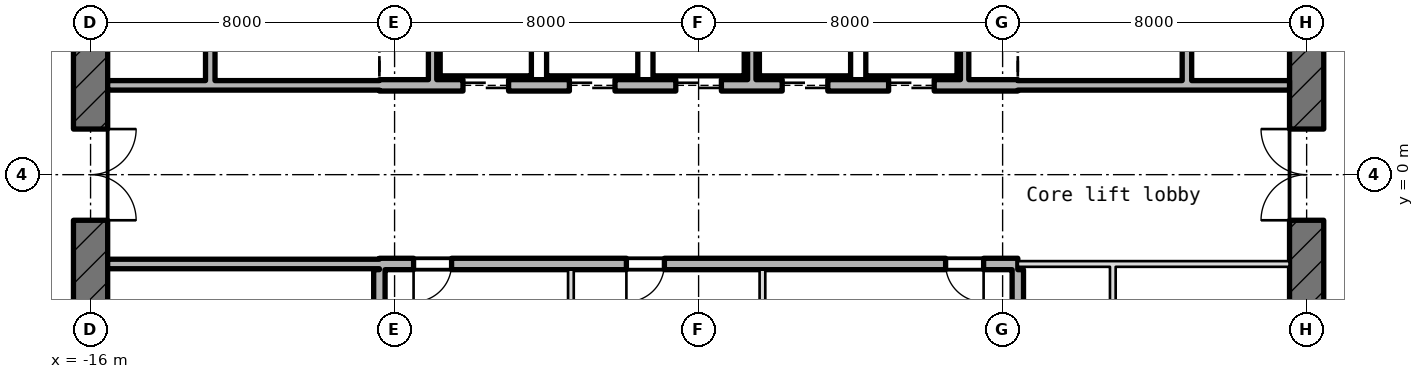
"""IFC4 building model, lengths in metres.
Left out: names, types, materials, properties, quantities, classifications, styles, units other than length and angle.
Written with IfcOpenShell. Run it as: python <this file> out.ifc"""

import sys

from ifc_helpers import new_model, si_unit, direction, frame, frame_2d, origin, place, context, subcontext, project, spatial, rectangle, extrude, element, fill, save


model = new_model("IFC4")
c1 = context("Model", 3, precision=1e-05, world=origin(), true_north=direction((0.0, 1.0)))
c2 = subcontext(c1, "Body", "Model", "MODEL_VIEW")
j1 = project(units=[si_unit("LENGTHUNIT", "METRE"), si_unit("PLANEANGLEUNIT", "RADIAN")], contexts=[c1])
p1 = place(None, origin())
s1 = spatial("IfcSite", under=j1, at=p1, CompositionType="ELEMENT")
p2 = place(p1, origin())
s2 = spatial("IfcBuilding", under=s1, at=p2, CompositionType="ELEMENT")
p3 = place(p2, frame((0.0, 0.0, 260.65)))
s3 = spatial("IfcBuildingStorey", under=s2, at=p3, CompositionType="ELEMENT", Elevation=260.65)
p4 = place(p3, frame((16.0, -10.186, -0.18), z_axis=(0.0, 0.0, 1.0), x_axis=(0.0, 1.0, 0.0)))
e1 = element("IfcWall", 1, at=p4, inside=s3, PredefinedType="SHEAR", context=c2, shape_type="SweptSolid", body=[
    extrude(rectangle(XDim=20.373, YDim=0.9, at=frame_2d((10.186, 0.0))), origin(), (0.0, 0.0, 1.0), 4.15),
])
p5 = place(p4, frame((8.986, 0.0, 0.18)))
e2 = element("IfcOpeningElement", 2, at=p5, cuts=e1, PredefinedType="OPENING", context=c2, shape_type="SweptSolid", body=[
    extrude(rectangle(XDim=2.4, YDim=2.1, at=frame_2d((1.2, 1.05))), frame((0.0, 0.46, 0.0), z_axis=(0.0, -1.0, 0.0), x_axis=(1.0, 0.0, 0.0)), (0.0, 0.0, 1.0), 0.92),
])
p6 = place(p4, frame((13.586, 0.0, 0.18)))
e3 = element("IfcOpeningElement", 3, at=p6, cuts=e1, PredefinedType="OPENING", context=c2, shape_type="SweptSolid", body=[
    extrude(rectangle(XDim=1.2, YDim=2.1, at=frame_2d((0.6, 1.05))), frame((0.0, 0.46, 0.0), z_axis=(0.0, -1.0, 0.0), x_axis=(1.0, 0.0, 0.0)), (0.0, 0.0, 1.0), 0.92),
])
p7 = place(p3, frame((-16.0, 10.186, -0.18), z_axis=(0.0, 0.0, 1.0), x_axis=(0.0, -1.0, 0.0)))
e4 = element("IfcWall", 4, at=p7, inside=s3, PredefinedType="SHEAR", context=c2, shape_type="SweptSolid", body=[
    extrude(rectangle(XDim=20.373, YDim=0.9, at=frame_2d((10.186, 0.0))), origin(), (0.0, 0.0, 1.0), 4.15),
])
p8 = place(p7, frame((8.986, 0.0, 0.18)))
e5 = element("IfcOpeningElement", 5, at=p8, cuts=e4, PredefinedType="OPENING", context=c2, shape_type="SweptSolid", body=[
    extrude(rectangle(XDim=2.4, YDim=2.1, at=frame_2d((1.2, 1.05))), frame((0.0, 0.46, 0.0), z_axis=(0.0, -1.0, 0.0), x_axis=(1.0, 0.0, 0.0)), (0.0, 0.0, 1.0), 0.92),
])
p9 = place(p7, frame((5.586, 0.0, 0.18)))
e6 = element("IfcOpeningElement", 6, at=p9, cuts=e4, PredefinedType="OPENING", context=c2, shape_type="SweptSolid", body=[
    extrude(rectangle(XDim=1.2, YDim=2.1, at=frame_2d((0.6, 1.05))), frame((0.0, 0.46, 0.0), z_axis=(0.0, -1.0, 0.0), x_axis=(1.0, 0.0, 0.0)), (0.0, 0.0, 1.0), 0.92),
])
p10 = place(p3, frame((-15.55, -2.35, 0.0), z_axis=(0.0, 0.0, 1.0), x_axis=(1.0, 0.0, 0.0)))
e7 = element("IfcWall", 7, at=p10, inside=s3, PredefinedType="STANDARD", context=c2, shape_type="SweptSolid", body=[
    extrude(rectangle(XDim=7.15, YDim=0.25, at=frame_2d((3.575, 0.0))), origin(), (0.0, 0.0, 1.0), 3.97),
])
p11 = place(p3, frame((-8.4, -2.35, -0.18), z_axis=(0.0, 0.0, 1.0), x_axis=(1.0, 0.0, 0.0)))
e8 = element("IfcWall", 8, at=p11, inside=s3, PredefinedType="SHEAR", context=c2, shape_type="SweptSolid", body=[
    extrude(rectangle(XDim=16.8, YDim=0.3, at=frame_2d((8.4, 0.0))), origin(), (0.0, 0.0, 1.0), 4.15),
])
p12 = place(p11, frame((0.9, 0.0, 0.18)))
e9 = element("IfcOpeningElement", 9, at=p12, cuts=e8, PredefinedType="OPENING", context=c2, shape_type="SweptSolid", body=[
    extrude(rectangle(XDim=1.0, YDim=2.1, at=frame_2d((0.5, 1.05))), frame((0.0, 0.16, 0.0), z_axis=(0.0, -1.0, 0.0), x_axis=(1.0, 0.0, 0.0)), (0.0, 0.0, 1.0), 0.32),
])
p13 = place(p11, frame((6.5, 0.0, 0.18)))
e10 = element("IfcOpeningElement", 10, at=p13, cuts=e8, PredefinedType="OPENING", context=c2, shape_type="SweptSolid", body=[
    extrude(rectangle(XDim=1.0, YDim=2.1, at=frame_2d((0.5, 1.05))), frame((0.0, 0.16, 0.0), z_axis=(0.0, -1.0, 0.0), x_axis=(1.0, 0.0, 0.0)), (0.0, 0.0, 1.0), 0.32),
])
p14 = place(p11, frame((14.9, 0.0, 0.18)))
e11 = element("IfcOpeningElement", 11, at=p14, cuts=e8, PredefinedType="OPENING", context=c2, shape_type="SweptSolid", body=[
    extrude(rectangle(XDim=1.0, YDim=2.1, at=frame_2d((0.5, 1.05))), frame((0.0, 0.16, 0.0), z_axis=(0.0, -1.0, 0.0), x_axis=(1.0, 0.0, 0.0)), (0.0, 0.0, 1.0), 0.32),
])
p15 = place(p3, frame((8.4, -2.35, 0.0), z_axis=(0.0, 0.0, 1.0), x_axis=(1.0, 0.0, 0.0)))
e12 = element("IfcWall", 12, at=p15, inside=s3, PredefinedType="PARTITIONING", context=c2, shape_type="SweptSolid", body=[
    extrude(rectangle(XDim=7.15, YDim=0.15, at=frame_2d((3.575, 0.0))), origin(), (0.0, 0.0, 1.0), 3.97),
])
p16 = place(p3, frame((-15.55, 2.35, 0.0), z_axis=(0.0, 0.0, 1.0), x_axis=(1.0, 0.0, 0.0)))
e13 = element("IfcWall", 13, at=p16, inside=s3, PredefinedType="STANDARD", context=c2, shape_type="SweptSolid", body=[
    extrude(rectangle(XDim=7.15, YDim=0.25, at=frame_2d((3.575, 0.0))), origin(), (0.0, 0.0, 1.0), 3.97),
])
p17 = place(p3, frame((-8.4, 2.35, -0.18), z_axis=(0.0, 0.0, 1.0), x_axis=(1.0, 0.0, 0.0)))
e14 = element("IfcWall", 14, at=p17, inside=s3, PredefinedType="SHEAR", context=c2, shape_type="SweptSolid", body=[
    extrude(rectangle(XDim=16.8, YDim=0.3, at=frame_2d((8.4, 0.0))), origin(), (0.0, 0.0, 1.0), 4.15),
])
p18 = place(p17, frame((2.2, 0.0, 0.18)))
e15 = element("IfcOpeningElement", 15, at=p18, cuts=e14, PredefinedType="OPENING", context=c2, shape_type="SweptSolid", body=[
    extrude(rectangle(XDim=1.2, YDim=2.1, at=frame_2d((0.6, 1.05))), frame((0.0, 0.16, 0.0), z_axis=(0.0, -1.0, 0.0), x_axis=(1.0, 0.0, 0.0)), (0.0, 0.0, 1.0), 0.32),
])
p19 = place(p17, frame((5.0, 0.0, 0.18)))
e16 = element("IfcOpeningElement", 16, at=p19, cuts=e14, PredefinedType="OPENING", context=c2, shape_type="SweptSolid", body=[
    extrude(rectangle(XDim=1.2, YDim=2.1, at=frame_2d((0.6, 1.05))), frame((0.0, 0.16, 0.0), z_axis=(0.0, -1.0, 0.0), x_axis=(1.0, 0.0, 0.0)), (0.0, 0.0, 1.0), 0.32),
])
p20 = place(p17, frame((7.8, 0.0, 0.18)))
e17 = element("IfcOpeningElement", 17, at=p20, cuts=e14, PredefinedType="OPENING", context=c2, shape_type="SweptSolid", body=[
    extrude(rectangle(XDim=1.2, YDim=2.1, at=frame_2d((0.6, 1.05))), frame((0.0, 0.16, 0.0), z_axis=(0.0, -1.0, 0.0), x_axis=(1.0, 0.0, 0.0)), (0.0, 0.0, 1.0), 0.32),
])
p21 = place(p17, frame((10.6, 0.0, 0.18)))
e18 = element("IfcOpeningElement", 18, at=p21, cuts=e14, PredefinedType="OPENING", context=c2, shape_type="SweptSolid", body=[
    extrude(rectangle(XDim=1.2, YDim=2.1, at=frame_2d((0.6, 1.05))), frame((0.0, 0.16, 0.0), z_axis=(0.0, -1.0, 0.0), x_axis=(1.0, 0.0, 0.0)), (0.0, 0.0, 1.0), 0.32),
])
p22 = place(p17, frame((13.4, 0.0, 0.18)))
e19 = element("IfcOpeningElement", 19, at=p22, cuts=e14, PredefinedType="OPENING", context=c2, shape_type="SweptSolid", body=[
    extrude(rectangle(XDim=1.2, YDim=2.1, at=frame_2d((0.6, 1.05))), frame((0.0, 0.16, 0.0), z_axis=(0.0, -1.0, 0.0), x_axis=(1.0, 0.0, 0.0)), (0.0, 0.0, 1.0), 0.32),
])
p23 = place(p3, frame((8.4, 2.35, 0.0), z_axis=(0.0, 0.0, 1.0), x_axis=(1.0, 0.0, 0.0)))
e20 = element("IfcWall", 20, at=p23, inside=s3, PredefinedType="STANDARD", context=c2, shape_type="SweptSolid", body=[
    extrude(rectangle(XDim=7.15, YDim=0.25, at=frame_2d((3.575, 0.0))), origin(), (0.0, 0.0, 1.0), 3.97),
])
p24 = place(p3, frame((-12.85, 2.475, 0.0), z_axis=(0.0, 0.0, 1.0), x_axis=(0.0, 1.0, 0.0)))
e21 = element("IfcWall", 21, at=p24, inside=s3, PredefinedType="STANDARD", context=c2, shape_type="SweptSolid", body=[
    extrude(rectangle(XDim=3.05, YDim=0.25, at=frame_2d((1.525, 0.0))), origin(), (0.0, 0.0, 1.0), 3.97),
])
p25 = place(p3, frame((-8.4, -8.75, -0.18), z_axis=(0.0, 0.0, 1.0), x_axis=(0.0, 1.0, 0.0)))
e22 = element("IfcWall", 22, at=p25, inside=s3, PredefinedType="SHEAR", context=c2, shape_type="SweptSolid", body=[
    extrude(rectangle(XDim=6.25, YDim=0.3, at=frame_2d((3.125, 0.0))), origin(), (0.0, 0.0, 1.0), 4.15),
])
p26 = place(p3, frame((-7.0, 2.5, 0.0), z_axis=(0.0, 0.0, 1.0), x_axis=(0.0, 1.0, 0.0)))
e23 = element("IfcWall", 23, at=p26, inside=s3, PredefinedType="STANDARD", context=c2, shape_type="SweptSolid", body=[
    extrude(rectangle(XDim=2.74, YDim=0.22, at=frame_2d((1.37, 0.0))), origin(), (0.0, 0.0, 1.0), 3.97),
])
p27 = place(p3, frame((-3.36, -5.24, 0.0), z_axis=(0.0, 0.0, 1.0), x_axis=(0.0, 1.0, 0.0)))
e24 = element("IfcWall", 24, at=p27, inside=s3, PredefinedType="PARTITIONING", context=c2, shape_type="SweptSolid", body=[
    extrude(rectangle(XDim=2.74, YDim=0.15, at=frame_2d((1.37, 0.0))), origin(), (0.0, 0.0, 1.0), 3.97),
])
p28 = place(p3, frame((1.4, 2.5, 0.0), z_axis=(0.0, 0.0, 1.0), x_axis=(0.0, 1.0, 0.0)))
e25 = element("IfcWall", 25, at=p28, inside=s3, PredefinedType="STANDARD", context=c2, shape_type="SweptSolid", body=[
    extrude(rectangle(XDim=2.74, YDim=0.22, at=frame_2d((1.37, 0.0))), origin(), (0.0, 0.0, 1.0), 3.97),
])
p29 = place(p3, frame((1.68, -5.24, 0.0), z_axis=(0.0, 0.0, 1.0), x_axis=(0.0, 1.0, 0.0)))
e26 = element("IfcWall", 26, at=p29, inside=s3, PredefinedType="PARTITIONING", context=c2, shape_type="SweptSolid", body=[
    extrude(rectangle(XDim=2.74, YDim=0.15, at=frame_2d((1.37, 0.0))), origin(), (0.0, 0.0, 1.0), 3.97),
])
p30 = place(p3, frame((7.0, 2.5, 0.0), z_axis=(0.0, 0.0, 1.0), x_axis=(0.0, 1.0, 0.0)))
e27 = element("IfcWall", 27, at=p30, inside=s3, PredefinedType="STANDARD", context=c2, shape_type="SweptSolid", body=[
    extrude(rectangle(XDim=2.74, YDim=0.22, at=frame_2d((1.37, 0.0))), origin(), (0.0, 0.0, 1.0), 3.97),
])
p31 = place(p3, frame((8.4, -8.35, -0.18), z_axis=(0.0, 0.0, 1.0), x_axis=(0.0, 1.0, 0.0)))
e28 = element("IfcWall", 28, at=p31, inside=s3, PredefinedType="SHEAR", context=c2, shape_type="SweptSolid", body=[
    extrude(rectangle(XDim=5.85, YDim=0.3, at=frame_2d((2.925, 0.0))), origin(), (0.0, 0.0, 1.0), 4.15),
])
p32 = place(p3, frame((10.9, -12.55, 0.0), z_axis=(0.0, 0.0, 1.0), x_axis=(0.0, 1.0, 0.0)))
e29 = element("IfcWall", 29, at=p32, inside=s3, PredefinedType="PARTITIONING", context=c2, shape_type="SweptSolid", body=[
    extrude(rectangle(XDim=10.125, YDim=0.15, at=frame_2d((5.062, 0.0))), origin(), (0.0, 0.0, 1.0), 3.97),
])
p33 = place(p32, frame((7.775, 0.0, 0.0)))
e30 = element("IfcOpeningElement", 30, at=p33, cuts=e29, PredefinedType="OPENING", context=c2, shape_type="SweptSolid", body=[
    extrude(rectangle(XDim=1.0, YDim=2.1, at=frame_2d((0.5, 1.05))), frame((0.0, 0.085, 0.0), z_axis=(0.0, -1.0, 0.0), x_axis=(1.0, 0.0, 0.0)), (0.0, 0.0, 1.0), 0.17),
])
p34 = place(p32, frame((2.675, 0.0, 0.0)))
e31 = element("IfcOpeningElement", 31, at=p34, cuts=e29, PredefinedType="OPENING", context=c2, shape_type="SweptSolid", body=[
    extrude(rectangle(XDim=1.0, YDim=2.1, at=frame_2d((0.5, 1.05))), frame((0.0, 0.085, 0.0), z_axis=(0.0, -1.0, 0.0), x_axis=(1.0, 0.0, 0.0)), (0.0, 0.0, 1.0), 0.17),
])
p35 = place(p3, frame((12.85, 2.475, 0.0), z_axis=(0.0, 0.0, 1.0), x_axis=(0.0, 1.0, 0.0)))
e32 = element("IfcWall", 32, at=p35, inside=s3, PredefinedType="STANDARD", context=c2, shape_type="SweptSolid", body=[
    extrude(rectangle(XDim=3.05, YDim=0.25, at=frame_2d((1.525, 0.0))), origin(), (0.0, 0.0, 1.0), 3.97),
])
p36 = place(p18, origin())
e33 = element("IfcDoor", 33, at=p36, inside=s3, OperationType="DOUBLE_DOOR_SLIDING", PredefinedType="DOOR", context=c2, shape_type="SweptSolid", body=[
    extrude(rectangle(XDim=1.2, YDim=2.1, at=frame_2d((0.6, 1.05))), frame((0.0, 0.025, 0.0), z_axis=(0.0, -1.0, 0.0), x_axis=(1.0, 0.0, 0.0)), (0.0, 0.0, 1.0), 0.05),
])
fill(e15, e33)
p37 = place(p19, origin())
e34 = element("IfcDoor", 34, at=p37, inside=s3, OperationType="DOUBLE_DOOR_SLIDING", PredefinedType="DOOR", context=c2, shape_type="SweptSolid", body=[
    extrude(rectangle(XDim=1.2, YDim=2.1, at=frame_2d((0.6, 1.05))), frame((0.0, 0.025, 0.0), z_axis=(0.0, -1.0, 0.0), x_axis=(1.0, 0.0, 0.0)), (0.0, 0.0, 1.0), 0.05),
])
fill(e16, e34)
p38 = place(p20, origin())
e35 = element("IfcDoor", 35, at=p38, inside=s3, OperationType="DOUBLE_DOOR_SLIDING", PredefinedType="DOOR", context=c2, shape_type="SweptSolid", body=[
    extrude(rectangle(XDim=1.2, YDim=2.1, at=frame_2d((0.6, 1.05))), frame((0.0, 0.025, 0.0), z_axis=(0.0, -1.0, 0.0), x_axis=(1.0, 0.0, 0.0)), (0.0, 0.0, 1.0), 0.05),
])
fill(e17, e35)
p39 = place(p21, origin())
e36 = element("IfcDoor", 36, at=p39, inside=s3, OperationType="DOUBLE_DOOR_SLIDING", PredefinedType="DOOR", context=c2, shape_type="SweptSolid", body=[
    extrude(rectangle(XDim=1.2, YDim=2.1, at=frame_2d((0.6, 1.05))), frame((0.0, 0.025, 0.0), z_axis=(0.0, -1.0, 0.0), x_axis=(1.0, 0.0, 0.0)), (0.0, 0.0, 1.0), 0.05),
])
fill(e18, e36)
p40 = place(p22, origin())
e37 = element("IfcDoor", 37, at=p40, inside=s3, OperationType="DOUBLE_DOOR_SLIDING", PredefinedType="DOOR", context=c2, shape_type="SweptSolid", body=[
    extrude(rectangle(XDim=1.2, YDim=2.1, at=frame_2d((0.6, 1.05))), frame((0.0, 0.025, 0.0), z_axis=(0.0, -1.0, 0.0), x_axis=(1.0, 0.0, 0.0)), (0.0, 0.0, 1.0), 0.05),
])
fill(e19, e37)
p41 = place(p8, origin())
e38 = element("IfcDoor", 38, at=p41, inside=s3, OperationType="DOUBLE_DOOR_SINGLE_SWING", PredefinedType="DOOR", context=c2, shape_type="SweptSolid", body=[
    extrude(rectangle(XDim=2.4, YDim=2.1, at=frame_2d((1.2, 1.05))), frame((0.0, 0.025, 0.0), z_axis=(0.0, -1.0, 0.0), x_axis=(1.0, 0.0, 0.0)), (0.0, 0.0, 1.0), 0.05),
])
fill(e5, e38)
p42 = place(p5, origin())
e39 = element("IfcDoor", 39, at=p42, inside=s3, OperationType="DOUBLE_DOOR_SINGLE_SWING", PredefinedType="DOOR", context=c2, shape_type="SweptSolid", body=[
    extrude(rectangle(XDim=2.4, YDim=2.1, at=frame_2d((1.2, 1.05))), frame((0.0, 0.025, 0.0), z_axis=(0.0, -1.0, 0.0), x_axis=(1.0, 0.0, 0.0)), (0.0, 0.0, 1.0), 0.05),
])
fill(e2, e39)
p43 = place(p12, frame((1.0, 0.0, 0.0), z_axis=(0.0, 0.0, 1.0), x_axis=(-1.0, 0.0, 0.0)))
e40 = element("IfcDoor", 40, at=p43, inside=s3, OperationType="SINGLE_SWING_LEFT", PredefinedType="DOOR", context=c2, shape_type="SweptSolid", body=[
    extrude(rectangle(XDim=1.0, YDim=2.1, at=frame_2d((0.5, 1.05))), frame((0.0, 0.025, 0.0), z_axis=(0.0, -1.0, 0.0), x_axis=(1.0, 0.0, 0.0)), (0.0, 0.0, 1.0), 0.05),
])
fill(e9, e40)
p44 = place(p13, frame((1.0, 0.0, 0.0), z_axis=(0.0, 0.0, 1.0), x_axis=(-1.0, 0.0, 0.0)))
e41 = element("IfcDoor", 41, at=p44, inside=s3, OperationType="SINGLE_SWING_LEFT", PredefinedType="DOOR", context=c2, shape_type="SweptSolid", body=[
    extrude(rectangle(XDim=1.0, YDim=2.1, at=frame_2d((0.5, 1.05))), frame((0.0, 0.025, 0.0), z_axis=(0.0, -1.0, 0.0), x_axis=(1.0, 0.0, 0.0)), (0.0, 0.0, 1.0), 0.05),
])
fill(e10, e41)
p45 = place(p14, frame((1.0, 0.0, 0.0), z_axis=(0.0, 0.0, 1.0), x_axis=(-1.0, 0.0, 0.0)))
e42 = element("IfcDoor", 42, at=p45, inside=s3, OperationType="SINGLE_SWING_LEFT", PredefinedType="DOOR", context=c2, shape_type="SweptSolid", body=[
    extrude(rectangle(XDim=1.0, YDim=2.1, at=frame_2d((0.5, 1.05))), frame((0.0, 0.025, 0.0), z_axis=(0.0, -1.0, 0.0), x_axis=(1.0, 0.0, 0.0)), (0.0, 0.0, 1.0), 0.05),
])
fill(e11, e42)
save(model, sys.argv[1])
